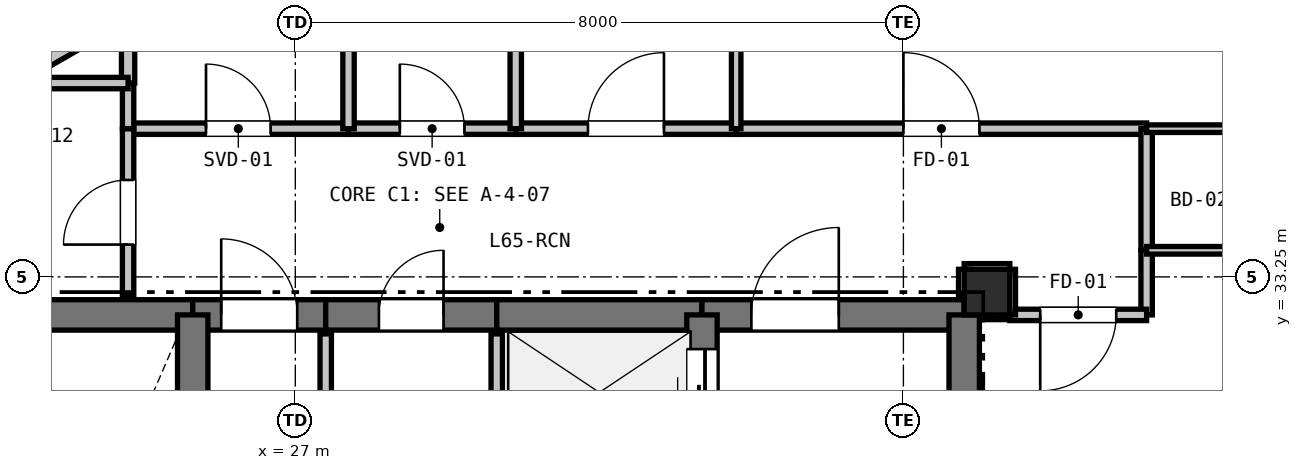
"""IFC4 building model, lengths in metres.
Left out: names, types, materials, properties, quantities, classifications, styles, units other than length and angle.
Written with IfcOpenShell. Run it as: python <this file> out.ifc"""

import sys

from ifc_helpers import new_model, si_unit, direction, frame, frame_2d, origin, origin_2d, place, context, subcontext, project, spatial, rectangle, extrude, element, fill, save


model = new_model("IFC4")
c1 = context("Model", 3, precision=1e-05, world=origin(), true_north=direction((0.0, 1.0)))
c2 = subcontext(c1, "Body", "Model", "MODEL_VIEW")
j1 = project(units=[si_unit("LENGTHUNIT", "METRE"), si_unit("PLANEANGLEUNIT", "RADIAN")], contexts=[c1])
p1 = place(None, origin())
s1 = spatial("IfcSite", under=j1, at=p1, CompositionType="ELEMENT")
p2 = place(p1, origin())
s2 = spatial("IfcBuilding", under=s1, at=p2, CompositionType="ELEMENT")
p3 = place(p2, frame((0.0, 0.0, 233.1)))
s3 = spatial("IfcBuildingStorey", under=s2, at=p3, CompositionType="ELEMENT", Elevation=233.1)
p4 = place(p3, frame((36.1, 33.05, 0.0), z_axis=(0.0, 0.0, 1.0), x_axis=(1.0, 0.0, 0.0)))
e1 = element("IfcColumn", 1, at=p4, inside=s3, PredefinedType="COLUMN", context=c2, shape_type="SweptSolid", body=[
    extrude(rectangle(XDim=0.6, YDim=0.6, at=origin_2d()), origin(), (0.0, 0.0, 1.0), 3.3),
])
p5 = place(p3, frame((20.066, 33.997, 0.0), z_axis=(0.0, 0.0, 1.0), x_axis=(0.866019557082, 0.500010126649, 0.0)))
e2 = element("IfcWall", 2, at=p5, inside=s3, PredefinedType="PARAPET", context=c2, shape_type="SweptSolid", body=[
    extrude(rectangle(XDim=8.228, YDim=0.2, at=frame_2d((4.114, 0.0))), origin(), (0.0, 0.0, 1.0), 0.2),
])
p6 = place(p3, frame((22.2, 32.75, 0.0), z_axis=(0.0, 0.0, 1.0), x_axis=(1.0, 0.0, 0.0)))
e3 = element("IfcWall", 3, at=p6, inside=s3, PredefinedType="SHEAR", context=c2, shape_type="SweptSolid", body=[
    extrude(rectangle(XDim=3.45, YDim=0.4, at=frame_2d((1.725, 0.0))), origin(), (0.0, 0.0, 1.0), 3.08),
])
p7 = place(p3, frame((25.65, 32.75, 0.0), z_axis=(0.0, 0.0, 1.0), x_axis=(1.0, 0.0, 0.0)))
e4 = element("IfcWall", 4, at=p7, inside=s3, PredefinedType="SHEAR", context=c2, shape_type="SweptSolid", body=[
    extrude(rectangle(XDim=1.75, YDim=0.4, at=frame_2d((0.875, 0.0))), origin(), (0.0, 0.0, 1.0), 3.08),
])
p8 = place(p7, frame((0.375, 0.0, 0.0)))
e5 = element("IfcOpeningElement", 5, at=p8, cuts=e4, PredefinedType="OPENING", context=c2, shape_type="SweptSolid", body=[
    extrude(rectangle(XDim=1.0, YDim=2.15, at=frame_2d((0.5, 1.075))), frame((0.0, 0.21, 0.0), z_axis=(0.0, -1.0, 0.0), x_axis=(1.0, 0.0, 0.0)), (0.0, 0.0, 1.0), 0.42),
])
p9 = place(p3, frame((27.4, 32.75, 0.0), z_axis=(0.0, 0.0, 1.0), x_axis=(1.0, 0.0, 0.0)))
e6 = element("IfcWall", 6, at=p9, inside=s3, PredefinedType="SHEAR", context=c2, shape_type="SweptSolid", body=[
    extrude(rectangle(XDim=2.25, YDim=0.4, at=frame_2d((1.125, 0.0))), origin(), (0.0, 0.0, 1.0), 3.08),
])
p10 = place(p9, frame((0.7, 0.0, 0.0)))
e7 = element("IfcOpeningElement", 7, at=p10, cuts=e6, PredefinedType="OPENING", context=c2, shape_type="SweptSolid", body=[
    extrude(rectangle(XDim=0.85, YDim=2.1, at=frame_2d((0.425, 1.05))), frame((0.0, 0.21, 0.0), z_axis=(0.0, -1.0, 0.0), x_axis=(1.0, 0.0, 0.0)), (0.0, 0.0, 1.0), 0.42),
])
p11 = place(p3, frame((29.65, 32.75, 0.0), z_axis=(0.0, 0.0, 1.0), x_axis=(1.0, 0.0, 0.0)))
e8 = element("IfcWall", 8, at=p11, inside=s3, PredefinedType="SHEAR", context=c2, shape_type="SweptSolid", body=[
    extrude(rectangle(XDim=2.7, YDim=0.4, at=frame_2d((1.35, 0.0))), origin(), (0.0, 0.0, 1.0), 3.08),
])
p12 = place(p3, frame((32.35, 32.75, 0.0), z_axis=(0.0, 0.0, 1.0), x_axis=(1.0, 0.0, 0.0)))
e9 = element("IfcWall", 9, at=p12, inside=s3, PredefinedType="SHEAR", context=c2, shape_type="SweptSolid", body=[
    extrude(rectangle(XDim=3.45, YDim=0.4, at=frame_2d((1.725, 0.0))), origin(), (0.0, 0.0, 1.0), 3.08),
])
p13 = place(p12, frame((0.65, 0.0, 0.0)))
e10 = element("IfcOpeningElement", 10, at=p13, cuts=e9, PredefinedType="OPENING", context=c2, shape_type="SweptSolid", body=[
    extrude(rectangle(XDim=1.15, YDim=2.15, at=frame_2d((0.575, 1.075))), frame((0.0, 0.21, 0.0), z_axis=(0.0, -1.0, 0.0), x_axis=(1.0, 0.0, 0.0)), (0.0, 0.0, 1.0), 0.42),
])
p14 = place(p3, frame((35.8, 32.75, 0.0), z_axis=(0.0, 0.0, 1.0), x_axis=(0.0, -1.0, 0.0)))
e11 = element("IfcWall", 11, at=p14, inside=s3, PredefinedType="SHEAR", context=c2, shape_type="SweptSolid", body=[
    extrude(rectangle(XDim=4.65, YDim=0.4, at=frame_2d((2.325, 0.0))), origin(), (0.0, 0.0, 1.0), 3.08),
])
p15 = place(p3, frame((25.65, 27.95, 0.0), z_axis=(0.0, 0.0, 1.0), x_axis=(0.0, 1.0, 0.0)))
e12 = element("IfcWall", 12, at=p15, inside=s3, PredefinedType="SHEAR", context=c2, shape_type="SweptSolid", body=[
    extrude(rectangle(XDim=4.8, YDim=0.4, at=frame_2d((2.4, 0.0))), origin(), (0.0, 0.0, 1.0), 3.08),
])
p16 = place(p3, frame((32.35, 30.75, 0.0), z_axis=(0.0, 0.0, 1.0), x_axis=(0.0, 1.0, 0.0)))
e13 = element("IfcWall", 13, at=p16, inside=s3, PredefinedType="SHEAR", context=c2, shape_type="SweptSolid", body=[
    extrude(rectangle(XDim=2.0, YDim=0.4, at=frame_2d((1.0, 0.0))), origin(), (0.0, 0.0, 1.0), 3.08),
])
p17 = place(p16, frame((0.45, 0.0, 0.0)))
e14 = element("IfcOpeningElement", 14, at=p17, cuts=e13, PredefinedType="OPENING", context=c2, shape_type="SweptSolid", body=[
    extrude(rectangle(XDim=1.1, YDim=2.15, at=frame_2d((0.55, 1.075))), frame((0.0, 0.21, 0.0), z_axis=(0.0, -1.0, 0.0), x_axis=(1.0, 0.0, 0.0)), (0.0, 0.0, 1.0), 0.42),
])
p18 = place(p3, frame((29.65, 30.3, 0.0), z_axis=(0.0, 0.0, 1.0), x_axis=(0.0, 1.0, 0.0)))
e15 = element("IfcWall", 15, at=p18, inside=s3, PredefinedType="PARTITIONING", context=c2, shape_type="SweptSolid", body=[
    extrude(rectangle(XDim=2.2, YDim=0.15, at=frame_2d((1.1, 0.0))), origin(), (0.0, 0.0, 1.0), 3.08),
])
p19 = place(p3, frame((27.4, 32.5, 0.0), z_axis=(0.0, 0.0, 1.0), x_axis=(0.0, -1.0, 0.0)))
e16 = element("IfcWall", 16, at=p19, inside=s3, PredefinedType="PARTITIONING", context=c2, shape_type="SweptSolid", body=[
    extrude(rectangle(XDim=3.25, YDim=0.15, at=frame_2d((1.625, 0.0))), origin(), (0.0, 0.0, 1.0), 3.08),
])
p20 = place(p19, frame((1.2, 0.0, 0.0)))
e17 = element("IfcOpeningElement", 17, at=p20, cuts=e16, PredefinedType="OPENING", context=c2, shape_type="SweptSolid", body=[
    extrude(rectangle(XDim=0.85, YDim=2.1, at=frame_2d((0.425, 1.05))), frame((0.0, 0.085, 0.0), z_axis=(0.0, -1.0, 0.0), x_axis=(1.0, 0.0, 0.0)), (0.0, 0.0, 1.0), 0.17),
])
p21 = place(p3, frame((24.8, 35.2, 0.0), z_axis=(0.0, 0.0, 1.0), x_axis=(1.0, 0.0, 0.0)))
e18 = element("IfcWall", 18, at=p21, inside=s3, PredefinedType="PARTITIONING", context=c2, shape_type="SweptSolid", body=[
    extrude(rectangle(XDim=2.9, YDim=0.15, at=frame_2d((1.45, 0.0))), origin(), (0.0, 0.0, 1.0), 3.08),
])
p22 = place(p21, frame((1.025, 0.0, 0.0)))
e19 = element("IfcOpeningElement", 19, at=p22, cuts=e18, PredefinedType="OPENING", context=c2, shape_type="SweptSolid", body=[
    extrude(rectangle(XDim=0.85, YDim=2.1, at=frame_2d((0.425, 1.05))), frame((0.0, 0.085, 0.0), z_axis=(0.0, -1.0, 0.0), x_axis=(1.0, 0.0, 0.0)), (0.0, 0.0, 1.0), 0.17),
])
p23 = place(p3, frame((27.7, 35.2, 0.0), z_axis=(0.0, 0.0, 1.0), x_axis=(1.0, 0.0, 0.0)))
e20 = element("IfcWall", 20, at=p23, inside=s3, PredefinedType="PARTITIONING", context=c2, shape_type="SweptSolid", body=[
    extrude(rectangle(XDim=2.2, YDim=0.15, at=frame_2d((1.1, 0.0))), origin(), (0.0, 0.0, 1.0), 3.08),
])
p24 = place(p23, frame((0.675, 0.0, 0.0)))
e21 = element("IfcOpeningElement", 21, at=p24, cuts=e20, PredefinedType="OPENING", context=c2, shape_type="SweptSolid", body=[
    extrude(rectangle(XDim=0.85, YDim=2.1, at=frame_2d((0.425, 1.05))), frame((0.0, 0.085, 0.0), z_axis=(0.0, -1.0, 0.0), x_axis=(1.0, 0.0, 0.0)), (0.0, 0.0, 1.0), 0.17),
])
p25 = place(p3, frame((29.9, 35.2, 0.0), z_axis=(0.0, 0.0, 1.0), x_axis=(1.0, 0.0, 0.0)))
e22 = element("IfcWall", 22, at=p25, inside=s3, PredefinedType="PARTITIONING", context=c2, shape_type="SweptSolid", body=[
    extrude(rectangle(XDim=2.9, YDim=0.15, at=frame_2d((1.45, 0.0))), origin(), (0.0, 0.0, 1.0), 3.08),
])
p26 = place(p25, frame((0.95, 0.0, 0.0)))
e23 = element("IfcOpeningElement", 23, at=p26, cuts=e22, PredefinedType="OPENING", context=c2, shape_type="SweptSolid", body=[
    extrude(rectangle(XDim=1.0, YDim=2.15, at=frame_2d((0.5, 1.075))), frame((0.0, 0.085, 0.0), z_axis=(0.0, -1.0, 0.0), x_axis=(1.0, 0.0, 0.0)), (0.0, 0.0, 1.0), 0.17),
])
p27 = place(p3, frame((32.8, 35.2, 0.0), z_axis=(0.0, 0.0, 1.0), x_axis=(1.0, 0.0, 0.0)))
e24 = element("IfcWall", 24, at=p27, inside=s3, PredefinedType="PARTITIONING", context=c2, shape_type="SweptSolid", body=[
    extrude(rectangle(XDim=5.4, YDim=0.15, at=frame_2d((2.7, 0.0))), origin(), (0.0, 0.0, 1.0), 2.528),
])
p28 = place(p27, frame((2.2, 0.0, 0.0)))
e25 = element("IfcOpeningElement", 25, at=p28, cuts=e24, PredefinedType="OPENING", context=c2, shape_type="SweptSolid", body=[
    extrude(rectangle(XDim=1.0, YDim=2.15, at=frame_2d((0.5, 1.075))), frame((0.0, 0.085, 0.0), z_axis=(0.0, -1.0, 0.0), x_axis=(1.0, 0.0, 0.0)), (0.0, 0.0, 1.0), 0.17),
])
p29 = place(p3, frame((38.2, 35.2, 0.0), z_axis=(0.0, 0.0, 1.0), x_axis=(0.0, -1.0, 0.0)))
e26 = element("IfcWall", 26, at=p29, inside=s3, PredefinedType="PARTITIONING", context=c2, shape_type="SweptSolid", body=[
    extrude(rectangle(XDim=1.6, YDim=0.15, at=frame_2d((0.8, 0.0))), origin(), (0.0, 0.0, 1.0), 3.08),
])
p30 = place(p3, frame((38.2, 33.6, 0.0), z_axis=(0.0, 0.0, 1.0), x_axis=(0.0, -1.0, 0.0)))
e27 = element("IfcWall", 27, at=p30, inside=s3, PredefinedType="PARTITIONING", context=c2, shape_type="SweptSolid", body=[
    extrude(rectangle(XDim=0.85, YDim=0.15, at=frame_2d((0.425, 0.0))), origin(), (0.0, 0.0, 1.0), 3.08),
])
p31 = place(p3, frame((38.2, 32.75, 0.0), z_axis=(0.0, 0.0, 1.0), x_axis=(-1.0, 0.0, 0.0)))
e28 = element("IfcWall", 28, at=p31, inside=s3, PredefinedType="PARTITIONING", context=c2, shape_type="SweptSolid", body=[
    extrude(rectangle(XDim=1.8, YDim=0.15, at=frame_2d((0.9, 0.0))), origin(), (0.0, 0.0, 1.0), 3.08),
])
p32 = place(p31, frame((0.4, 0.0, 0.0)))
e29 = element("IfcOpeningElement", 29, at=p32, cuts=e28, PredefinedType="OPENING", context=c2, shape_type="SweptSolid", body=[
    extrude(rectangle(XDim=1.0, YDim=2.15, at=frame_2d((0.5, 1.075))), frame((0.0, 0.085, 0.0), z_axis=(0.0, -1.0, 0.0), x_axis=(1.0, 0.0, 0.0)), (0.0, 0.0, 1.0), 0.17),
])
p33 = place(p3, frame((36.4, 32.75, 0.0), z_axis=(0.0, 0.0, 1.0), x_axis=(0.0, 1.0, 0.0)))
e30 = element("IfcWall", 30, at=p33, inside=s3, PredefinedType="PARTITIONING", context=c2, shape_type="SweptSolid", body=[
    extrude(rectangle(XDim=0.6, YDim=0.15, at=frame_2d((0.3, 0.0))), origin(), (0.0, 0.0, 1.0), 2.528),
])
p34 = place(p3, frame((36.4, 33.35, 0.0), z_axis=(0.0, 0.0, 1.0), x_axis=(-1.0, 0.0, 0.0)))
e31 = element("IfcWall", 31, at=p34, inside=s3, PredefinedType="PARTITIONING", context=c2, shape_type="SweptSolid", body=[
    extrude(rectangle(XDim=0.6, YDim=0.15, at=frame_2d((0.3, 0.0))), origin(), (0.0, 0.0, 1.0), 2.528),
])
p35 = place(p3, frame((35.8, 33.35, 0.0), z_axis=(0.0, 0.0, 1.0), x_axis=(0.0, -1.0, 0.0)))
e32 = element("IfcWall", 32, at=p35, inside=s3, PredefinedType="PARTITIONING", context=c2, shape_type="SweptSolid", body=[
    extrude(rectangle(XDim=0.35, YDim=0.15, at=frame_2d((0.175, 0.0))), origin(), (0.0, 0.0, 1.0), 2.605),
])
p36 = place(p3, frame((24.8, 33.0, 0.0), z_axis=(0.0, 0.0, 1.0), x_axis=(0.0, 1.0, 0.0)))
e33 = element("IfcWall", 33, at=p36, inside=s3, PredefinedType="PARTITIONING", context=c2, shape_type="SweptSolid", body=[
    extrude(rectangle(XDim=2.2, YDim=0.15, at=frame_2d((1.1, 0.0))), origin(), (0.0, 0.0, 1.0), 2.605),
])
p37 = place(p36, frame((0.675, 0.0, 0.0)))
e34 = element("IfcOpeningElement", 34, at=p37, cuts=e33, PredefinedType="OPENING", context=c2, shape_type="SweptSolid", body=[
    extrude(rectangle(XDim=0.85, YDim=2.1, at=frame_2d((0.425, 1.05))), frame((0.0, 0.085, 0.0), z_axis=(0.0, -1.0, 0.0), x_axis=(1.0, 0.0, 0.0)), (0.0, 0.0, 1.0), 0.17),
])
p38 = place(p3, frame((27.7, 38.053, 0.0), z_axis=(0.0, 0.0, 1.0), x_axis=(0.0, -1.0, 0.0)))
e35 = element("IfcWall", 35, at=p38, inside=s3, PredefinedType="PARTITIONING", context=c2, shape_type="SweptSolid", body=[
    extrude(rectangle(XDim=2.853, YDim=0.15, at=frame_2d((1.427, 0.0))), origin(), (0.0, 0.0, 1.0), 2.365),
])
p39 = place(p3, frame((24.8, 35.2, 0.0), z_axis=(0.0, 0.0, 1.0), x_axis=(0.0, 1.0, 0.0)))
e36 = element("IfcWall", 36, at=p39, inside=s3, PredefinedType="PARTITIONING", context=c2, shape_type="SweptSolid", body=[
    extrude(rectangle(XDim=0.6, YDim=0.15, at=frame_2d((0.3, 0.0))), origin(), (0.0, 0.0, 1.0), 3.08),
])
p40 = place(p3, frame((24.8, 35.8, 0.0), z_axis=(0.0, 0.0, 1.0), x_axis=(0.0, 1.0, 0.0)))
e37 = element("IfcWall", 37, at=p40, inside=s3, PredefinedType="PLUMBINGWALL", context=c2, shape_type="SweptSolid", body=[
    extrude(rectangle(XDim=0.884, YDim=0.175, at=frame_2d((0.442, 0.0))), origin(), (0.0, 0.0, 1.0), 2.365),
])
p41 = place(p3, frame((39.606, 35.2, 0.0), z_axis=(0.0, 0.0, 1.0), x_axis=(-1.0, 0.0, 0.0)))
e38 = element("IfcWall", 38, at=p41, inside=s3, PredefinedType="PARTITIONING", context=c2, shape_type="SweptSolid", body=[
    extrude(rectangle(XDim=1.406, YDim=0.1, at=frame_2d((0.703, 0.0))), origin(), (0.0, 0.0, 1.0), 2.365),
])
p42 = place(p3, frame((32.8, 35.2, 0.0), z_axis=(0.0, 0.0, 1.0), x_axis=(0.0, 1.0, 0.0)))
e39 = element("IfcWall", 39, at=p42, inside=s3, PredefinedType="PARTITIONING", context=c2, shape_type="SweptSolid", body=[
    extrude(rectangle(XDim=5.991, YDim=0.125, at=frame_2d((2.996, 0.0))), origin(), (0.0, 0.0, 1.0), 3.08),
])
p43 = place(p3, frame((36.05, 32.75, 0.0), z_axis=(0.0, 0.0, 1.0), x_axis=(1.0, 0.0, 0.0)))
e40 = element("IfcWall", 40, at=p43, inside=s3, PredefinedType="PARTITIONING", context=c2, shape_type="SweptSolid", body=[
    extrude(rectangle(XDim=0.35, YDim=0.125, at=frame_2d((0.175, 0.0))), origin(), (0.0, 0.0, 1.0), 2.605),
])
p44 = place(p3, frame((38.2, 33.6, 0.0), z_axis=(0.0, 0.0, 1.0), x_axis=(1.0, 0.0, 0.0)))
e41 = element("IfcWall", 41, at=p44, inside=s3, PredefinedType="PARTITIONING", context=c2, shape_type="SweptSolid", body=[
    extrude(rectangle(XDim=1.406, YDim=0.1, at=frame_2d((0.703, 0.0))), origin(), (0.0, 0.0, 1.0), 2.365),
])
p45 = place(p3, frame((29.9, 37.5, 0.0), z_axis=(0.0, 0.0, 1.0), x_axis=(0.0, -1.0, 0.0)))
e42 = element("IfcWall", 42, at=p45, inside=s3, PredefinedType="PARTITIONING", context=c2, shape_type="SweptSolid", body=[
    extrude(rectangle(XDim=2.3, YDim=0.15, at=frame_2d((1.15, 0.0))), origin(), (0.0, 0.0, 1.0), 3.08),
])
p46 = place(p3, frame((23.262, 35.8, 0.0), z_axis=(0.0, 0.0, 1.0), x_axis=(1.0, 0.0, 0.0)))
e43 = element("IfcWall", 43, at=p46, inside=s3, PredefinedType="PARTITIONING", context=c2, shape_type="SweptSolid", body=[
    extrude(rectangle(XDim=1.538, YDim=0.15, at=frame_2d((0.769, 0.0))), origin(), (0.0, 0.0, 1.0), 2.365),
])
p47 = place(p8, origin())
e44 = element("IfcDoor", 44, at=p47, inside=s3, OperationType="SINGLE_SWING_LEFT", PredefinedType="DOOR", context=c2, shape_type="SweptSolid", body=[
    extrude(rectangle(XDim=1.0, YDim=2.15, at=frame_2d((0.5, 1.075))), frame((0.0, 0.025, 0.0), z_axis=(0.0, -1.0, 0.0), x_axis=(1.0, 0.0, 0.0)), (0.0, 0.0, 1.0), 0.05),
])
fill(e5, e44)
p48 = place(p17, origin())
e45 = element("IfcDoor", 45, at=p48, inside=s3, OperationType="SLIDING_TO_LEFT", PredefinedType="DOOR", context=c2, shape_type="SweptSolid", body=[
    extrude(rectangle(XDim=1.1, YDim=2.15, at=frame_2d((0.55, 1.075))), frame((0.0, 0.025, 0.0), z_axis=(0.0, -1.0, 0.0), x_axis=(1.0, 0.0, 0.0)), (0.0, 0.0, 1.0), 0.05),
])
fill(e14, e45)
p49 = place(p13, origin())
e46 = element("IfcDoor", 46, at=p49, inside=s3, OperationType="SINGLE_SWING_RIGHT", PredefinedType="DOOR", context=c2, shape_type="SweptSolid", body=[
    extrude(rectangle(XDim=1.15, YDim=2.15, at=frame_2d((0.575, 1.075))), frame((0.0, 0.025, 0.0), z_axis=(0.0, -1.0, 0.0), x_axis=(1.0, 0.0, 0.0)), (0.0, 0.0, 1.0), 0.05),
])
fill(e10, e46)
p50 = place(p22, origin())
e47 = element("IfcDoor", 47, at=p50, inside=s3, OperationType="SINGLE_SWING_LEFT", PredefinedType="DOOR", context=c2, shape_type="SweptSolid", body=[
    extrude(rectangle(XDim=0.85, YDim=2.1, at=frame_2d((0.425, 1.05))), frame((0.0, 0.025, 0.0), z_axis=(0.0, -1.0, 0.0), x_axis=(1.0, 0.0, 0.0)), (0.0, 0.0, 1.0), 0.05),
])
fill(e19, e47)
p51 = place(p10, origin())
e48 = element("IfcDoor", 48, at=p51, inside=s3, OperationType="SINGLE_SWING_RIGHT", PredefinedType="DOOR", context=c2, shape_type="SweptSolid", body=[
    extrude(rectangle(XDim=0.85, YDim=2.1, at=frame_2d((0.425, 1.05))), frame((0.0, 0.025, 0.0), z_axis=(0.0, -1.0, 0.0), x_axis=(1.0, 0.0, 0.0)), (0.0, 0.0, 1.0), 0.05),
])
fill(e7, e48)
p52 = place(p28, origin())
e49 = element("IfcDoor", 49, at=p52, inside=s3, OperationType="SINGLE_SWING_LEFT", PredefinedType="DOOR", context=c2, shape_type="SweptSolid", body=[
    extrude(rectangle(XDim=1.0, YDim=2.15, at=frame_2d((0.5, 1.075))), frame((0.0, 0.025, 0.0), z_axis=(0.0, -1.0, 0.0), x_axis=(1.0, 0.0, 0.0)), (0.0, 0.0, 1.0), 0.05),
])
fill(e25, e49)
p53 = place(p32, origin())
e50 = element("IfcDoor", 50, at=p53, inside=s3, OperationType="SINGLE_SWING_RIGHT", PredefinedType="DOOR", context=c2, shape_type="SweptSolid", body=[
    extrude(rectangle(XDim=1.0, YDim=2.15, at=frame_2d((0.5, 1.075))), frame((0.0, 0.025, 0.0), z_axis=(0.0, -1.0, 0.0), x_axis=(1.0, 0.0, 0.0)), (0.0, 0.0, 1.0), 0.05),
])
fill(e29, e50)
p54 = place(p24, origin())
e51 = element("IfcDoor", 51, at=p54, inside=s3, OperationType="SINGLE_SWING_LEFT", PredefinedType="DOOR", context=c2, shape_type="SweptSolid", body=[
    extrude(rectangle(XDim=0.85, YDim=2.1, at=frame_2d((0.425, 1.05))), frame((0.0, 0.025, 0.0), z_axis=(0.0, -1.0, 0.0), x_axis=(1.0, 0.0, 0.0)), (0.0, 0.0, 1.0), 0.05),
])
fill(e21, e51)
p55 = place(p26, origin())
e52 = element("IfcDoor", 52, at=p55, inside=s3, OperationType="SINGLE_SWING_RIGHT", PredefinedType="DOOR", context=c2, shape_type="SweptSolid", body=[
    extrude(rectangle(XDim=1.0, YDim=2.15, at=frame_2d((0.5, 1.075))), frame((0.0, 0.025, 0.0), z_axis=(0.0, -1.0, 0.0), x_axis=(1.0, 0.0, 0.0)), (0.0, 0.0, 1.0), 0.05),
])
fill(e23, e52)
p56 = place(p37, origin())
e53 = element("IfcDoor", 53, at=p56, inside=s3, OperationType="SINGLE_SWING_LEFT", PredefinedType="DOOR", context=c2, shape_type="SweptSolid", body=[
    extrude(rectangle(XDim=0.85, YDim=2.1, at=frame_2d((0.425, 1.05))), frame((0.0, 0.025, 0.0), z_axis=(0.0, -1.0, 0.0), x_axis=(1.0, 0.0, 0.0)), (0.0, 0.0, 1.0), 0.05),
])
fill(e34, e53)
save(model, sys.argv[1])
